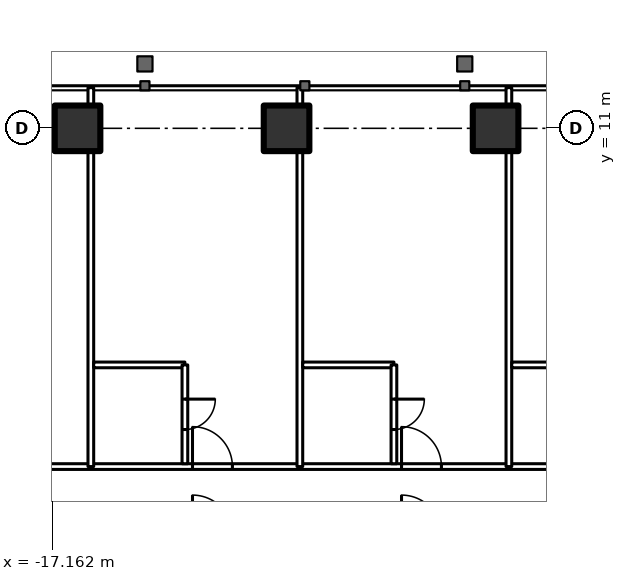
"""IFC4 building model, lengths in metres.
Left out: names, types, materials, properties, quantities, classifications, styles, units other than length and angle.
Written with IfcOpenShell. Run it as: python <this file> out.ifc"""

import sys

from ifc_helpers import new_model, si_unit, direction, frame, frame_2d, origin, origin_2d, place, context, subcontext, project, spatial, rectangle, hollow_rectangle, extrude, element, fill, save


model = new_model("IFC4")
c1 = context("Model", 3, precision=1e-05, world=origin(), true_north=direction((0.0, 1.0)))
c2 = subcontext(c1, "Body", "Model", "MODEL_VIEW")
j1 = project(units=[si_unit("LENGTHUNIT", "METRE"), si_unit("PLANEANGLEUNIT", "RADIAN")], contexts=[c1])
p1 = place(None, origin())
s1 = spatial("IfcSite", under=j1, at=p1, CompositionType="ELEMENT")
p2 = place(p1, origin())
s2 = spatial("IfcBuilding", under=s1, at=p2, CompositionType="ELEMENT")
p3 = place(p2, frame((0.0, 0.0, 215.3)))
s3 = spatial("IfcBuildingStorey", under=s2, at=p3, CompositionType="ELEMENT", Elevation=215.3)
for number, where, z_axis, x_axis in (
    (1, (-16.5, 11.0, 0.0), (0.0, 0.0, 1.0), (1.0, 0.0, 0.0)),
    (2, (-11.0, 11.0, 0.0), (0.0, 0.0, 1.0), (1.0, 0.0, 0.0)),
    (3, (-5.5, 11.0, 0.0), (0.0, 0.0, 1.0), (1.0, 0.0, 0.0)),
):
    element("IfcColumn", number, at=place(p3, frame(where, z_axis=z_axis, x_axis=x_axis)), inside=s3, PredefinedType="COLUMN", context=c2, shape_type="SweptSolid", body=[
        extrude(hollow_rectangle(XDim=1.2, YDim=1.2, WallThickness=0.12, at=origin_2d()), origin(), (0.0, 0.0, 1.0), 3.6),
    ])
p4 = place(p3, frame((-27.5, 2.1, 0.0), z_axis=(0.0, 0.0, 1.0), x_axis=(1.0, 0.0, 0.0)))
e4 = element("IfcWall", 4, at=p4, inside=s3, PredefinedType="PARTITIONING", context=c2, shape_type="SweptSolid", body=[
    extrude(rectangle(XDim=55.0, YDim=0.15, at=frame_2d((27.5, 0.0))), origin(), (0.0, 0.0, 1.0), 3.4),
])
p5 = place(p4, frame((2.025, 0.0, 0.0)))
e5 = element("IfcOpeningElement", 5, at=p5, cuts=e4, PredefinedType="OPENING", context=c2, shape_type="SweptSolid", body=[
    extrude(rectangle(XDim=1.05, YDim=2.4, at=frame_2d((0.525, 1.2))), frame((0.0, 0.085, 0.0), z_axis=(0.0, -1.0, 0.0), x_axis=(1.0, 0.0, 0.0)), (0.0, 0.0, 1.0), 0.17),
])
p6 = place(p4, frame((8.525, 0.0, 0.0)))
e6 = element("IfcOpeningElement", 6, at=p6, cuts=e4, PredefinedType="OPENING", context=c2, shape_type="SweptSolid", body=[
    extrude(rectangle(XDim=1.05, YDim=2.4, at=frame_2d((0.525, 1.2))), frame((0.0, 0.085, 0.0), z_axis=(0.0, -1.0, 0.0), x_axis=(1.0, 0.0, 0.0)), (0.0, 0.0, 1.0), 0.17),
])
p7 = place(p4, frame((14.025, 0.0, 0.0)))
e7 = element("IfcOpeningElement", 7, at=p7, cuts=e4, PredefinedType="OPENING", context=c2, shape_type="SweptSolid", body=[
    extrude(rectangle(XDim=1.05, YDim=2.4, at=frame_2d((0.525, 1.2))), frame((0.0, 0.085, 0.0), z_axis=(0.0, -1.0, 0.0), x_axis=(1.0, 0.0, 0.0)), (0.0, 0.0, 1.0), 0.17),
])
p8 = place(p4, frame((19.525, 0.0, 0.0)))
e8 = element("IfcOpeningElement", 8, at=p8, cuts=e4, PredefinedType="OPENING", context=c2, shape_type="SweptSolid", body=[
    extrude(rectangle(XDim=1.05, YDim=2.4, at=frame_2d((0.525, 1.2))), frame((0.0, 0.085, 0.0), z_axis=(0.0, -1.0, 0.0), x_axis=(1.0, 0.0, 0.0)), (0.0, 0.0, 1.0), 0.17),
])
p9 = place(p4, frame((25.025, 0.0, 0.0)))
e9 = element("IfcOpeningElement", 9, at=p9, cuts=e4, PredefinedType="OPENING", context=c2, shape_type="SweptSolid", body=[
    extrude(rectangle(XDim=1.05, YDim=2.4, at=frame_2d((0.525, 1.2))), frame((0.0, 0.085, 0.0), z_axis=(0.0, -1.0, 0.0), x_axis=(1.0, 0.0, 0.0)), (0.0, 0.0, 1.0), 0.17),
])
p10 = place(p4, frame((30.525, 0.0, 0.0)))
e10 = element("IfcOpeningElement", 10, at=p10, cuts=e4, PredefinedType="OPENING", context=c2, shape_type="SweptSolid", body=[
    extrude(rectangle(XDim=1.05, YDim=2.4, at=frame_2d((0.525, 1.2))), frame((0.0, 0.085, 0.0), z_axis=(0.0, -1.0, 0.0), x_axis=(1.0, 0.0, 0.0)), (0.0, 0.0, 1.0), 0.17),
])
p11 = place(p4, frame((36.025, 0.0, 0.0)))
e11 = element("IfcOpeningElement", 11, at=p11, cuts=e4, PredefinedType="OPENING", context=c2, shape_type="SweptSolid", body=[
    extrude(rectangle(XDim=1.05, YDim=2.4, at=frame_2d((0.525, 1.2))), frame((0.0, 0.085, 0.0), z_axis=(0.0, -1.0, 0.0), x_axis=(1.0, 0.0, 0.0)), (0.0, 0.0, 1.0), 0.17),
])
p12 = place(p4, frame((41.525, 0.0, 0.0)))
e12 = element("IfcOpeningElement", 12, at=p12, cuts=e4, PredefinedType="OPENING", context=c2, shape_type="SweptSolid", body=[
    extrude(rectangle(XDim=1.05, YDim=2.4, at=frame_2d((0.525, 1.2))), frame((0.0, 0.085, 0.0), z_axis=(0.0, -1.0, 0.0), x_axis=(1.0, 0.0, 0.0)), (0.0, 0.0, 1.0), 0.17),
])
p13 = place(p4, frame((47.025, 0.0, 0.0)))
e13 = element("IfcOpeningElement", 13, at=p13, cuts=e4, PredefinedType="OPENING", context=c2, shape_type="SweptSolid", body=[
    extrude(rectangle(XDim=1.05, YDim=2.4, at=frame_2d((0.525, 1.2))), frame((0.0, 0.085, 0.0), z_axis=(0.0, -1.0, 0.0), x_axis=(1.0, 0.0, 0.0)), (0.0, 0.0, 1.0), 0.17),
])
p14 = place(p4, frame((52.525, 0.0, 0.0)))
e14 = element("IfcOpeningElement", 14, at=p14, cuts=e4, PredefinedType="OPENING", context=c2, shape_type="SweptSolid", body=[
    extrude(rectangle(XDim=1.05, YDim=2.4, at=frame_2d((0.525, 1.2))), frame((0.0, 0.085, 0.0), z_axis=(0.0, -1.0, 0.0), x_axis=(1.0, 0.0, 0.0)), (0.0, 0.0, 1.0), 0.17),
])
for number, where, z_axis, x_axis in (
    (15, (-16.15, 2.1, 0.0), (0.0, 0.0, 1.0), (0.0, 1.0, 0.0)),
    (16, (-10.65, 2.1, 0.0), (0.0, 0.0, 1.0), (0.0, 1.0, 0.0)),
    (17, (-5.15, 2.1, 0.0), (0.0, 0.0, 1.0), (0.0, 1.0, 0.0)),
):
    element("IfcWall", number, at=place(p3, frame(where, z_axis=z_axis, x_axis=x_axis)), inside=s3, PredefinedType="PARTITIONING", context=c2, shape_type="SweptSolid", body=[
        extrude(rectangle(XDim=9.97, YDim=0.15, at=frame_2d((4.985, 0.0))), origin(), (0.0, 0.0, 1.0), 3.4),
    ])
p15 = place(p3, frame((-16.075, 4.775, 0.0), z_axis=(0.0, 0.0, 1.0), x_axis=(1.0, 0.0, 0.0)))
e18 = element("IfcWall", 18, at=p15, inside=s3, PredefinedType="PARTITIONING", context=c2, shape_type="SweptSolid", body=[
    extrude(rectangle(XDim=2.4, YDim=0.15, at=frame_2d((1.2, 0.0))), origin(), (0.0, 0.0, 1.0), 3.4),
])
p16 = place(p3, frame((-13.675, 2.175, 0.0), z_axis=(0.0, 0.0, 1.0), x_axis=(0.0, 1.0, 0.0)))
e19 = element("IfcWall", 19, at=p16, inside=s3, PredefinedType="PARTITIONING", context=c2, shape_type="SweptSolid", body=[
    extrude(rectangle(XDim=2.6, YDim=0.15, at=frame_2d((1.3, 0.0))), origin(), (0.0, 0.0, 1.0), 3.4),
])
p17 = place(p16, frame((0.9, 0.0, 0.0)))
e20 = element("IfcOpeningElement", 20, at=p17, cuts=e19, PredefinedType="OPENING", context=c2, shape_type="SweptSolid", body=[
    extrude(rectangle(XDim=0.8, YDim=2.2, at=frame_2d((0.4, 1.1))), frame((0.0, 0.085, 0.0), z_axis=(0.0, -1.0, 0.0), x_axis=(1.0, 0.0, 0.0)), (0.0, 0.0, 1.0), 0.17),
])
p18 = place(p3, frame((-10.575, 4.775, 0.0), z_axis=(0.0, 0.0, 1.0), x_axis=(1.0, 0.0, 0.0)))
e21 = element("IfcWall", 21, at=p18, inside=s3, PredefinedType="PARTITIONING", context=c2, shape_type="SweptSolid", body=[
    extrude(rectangle(XDim=2.4, YDim=0.15, at=frame_2d((1.2, 0.0))), origin(), (0.0, 0.0, 1.0), 3.4),
])
p19 = place(p3, frame((-8.175, 2.175, 0.0), z_axis=(0.0, 0.0, 1.0), x_axis=(0.0, 1.0, 0.0)))
e22 = element("IfcWall", 22, at=p19, inside=s3, PredefinedType="PARTITIONING", context=c2, shape_type="SweptSolid", body=[
    extrude(rectangle(XDim=2.6, YDim=0.15, at=frame_2d((1.3, 0.0))), origin(), (0.0, 0.0, 1.0), 3.4),
])
p20 = place(p19, frame((0.9, 0.0, 0.0)))
e23 = element("IfcOpeningElement", 23, at=p20, cuts=e22, PredefinedType="OPENING", context=c2, shape_type="SweptSolid", body=[
    extrude(rectangle(XDim=0.8, YDim=2.2, at=frame_2d((0.4, 1.1))), frame((0.0, 0.085, 0.0), z_axis=(0.0, -1.0, 0.0), x_axis=(1.0, 0.0, 0.0)), (0.0, 0.0, 1.0), 0.17),
])
p21 = place(p3, frame((-5.075, 4.775, 0.0), z_axis=(0.0, 0.0, 1.0), x_axis=(1.0, 0.0, 0.0)))
e24 = element("IfcWall", 24, at=p21, inside=s3, PredefinedType="PARTITIONING", context=c2, shape_type="SweptSolid", body=[
    extrude(rectangle(XDim=2.4, YDim=0.15, at=frame_2d((1.2, 0.0))), origin(), (0.0, 0.0, 1.0), 3.4),
])
p22 = place(p17, origin())
e25 = element("IfcDoor", 25, at=p22, inside=s3, OperationType="SINGLE_SWING_RIGHT", PredefinedType="DOOR", context=c2, shape_type="SweptSolid", body=[
    extrude(rectangle(XDim=0.8, YDim=2.2, at=frame_2d((0.4, 1.1))), frame((0.0, 0.025, 0.0), z_axis=(0.0, -1.0, 0.0), x_axis=(1.0, 0.0, 0.0)), (0.0, 0.0, 1.0), 0.05),
])
fill(e20, e25)
p23 = place(p7, origin())
e26 = element("IfcDoor", 26, at=p23, inside=s3, OperationType="SINGLE_SWING_LEFT", PredefinedType="DOOR", context=c2, shape_type="SweptSolid", body=[
    extrude(rectangle(XDim=1.05, YDim=2.4, at=frame_2d((0.525, 1.2))), frame((0.0, 0.025, 0.0), z_axis=(0.0, -1.0, 0.0), x_axis=(1.0, 0.0, 0.0)), (0.0, 0.0, 1.0), 0.05),
])
fill(e7, e26)
p24 = place(p20, origin())
e27 = element("IfcDoor", 27, at=p24, inside=s3, OperationType="SINGLE_SWING_RIGHT", PredefinedType="DOOR", context=c2, shape_type="SweptSolid", body=[
    extrude(rectangle(XDim=0.8, YDim=2.2, at=frame_2d((0.4, 1.1))), frame((0.0, 0.025, 0.0), z_axis=(0.0, -1.0, 0.0), x_axis=(1.0, 0.0, 0.0)), (0.0, 0.0, 1.0), 0.05),
])
fill(e23, e27)
p25 = place(p8, origin())
e28 = element("IfcDoor", 28, at=p25, inside=s3, OperationType="SINGLE_SWING_LEFT", PredefinedType="DOOR", context=c2, shape_type="SweptSolid", body=[
    extrude(rectangle(XDim=1.05, YDim=2.4, at=frame_2d((0.525, 1.2))), frame((0.0, 0.025, 0.0), z_axis=(0.0, -1.0, 0.0), x_axis=(1.0, 0.0, 0.0)), (0.0, 0.0, 1.0), 0.05),
])
fill(e8, e28)
save(model, sys.argv[1])
